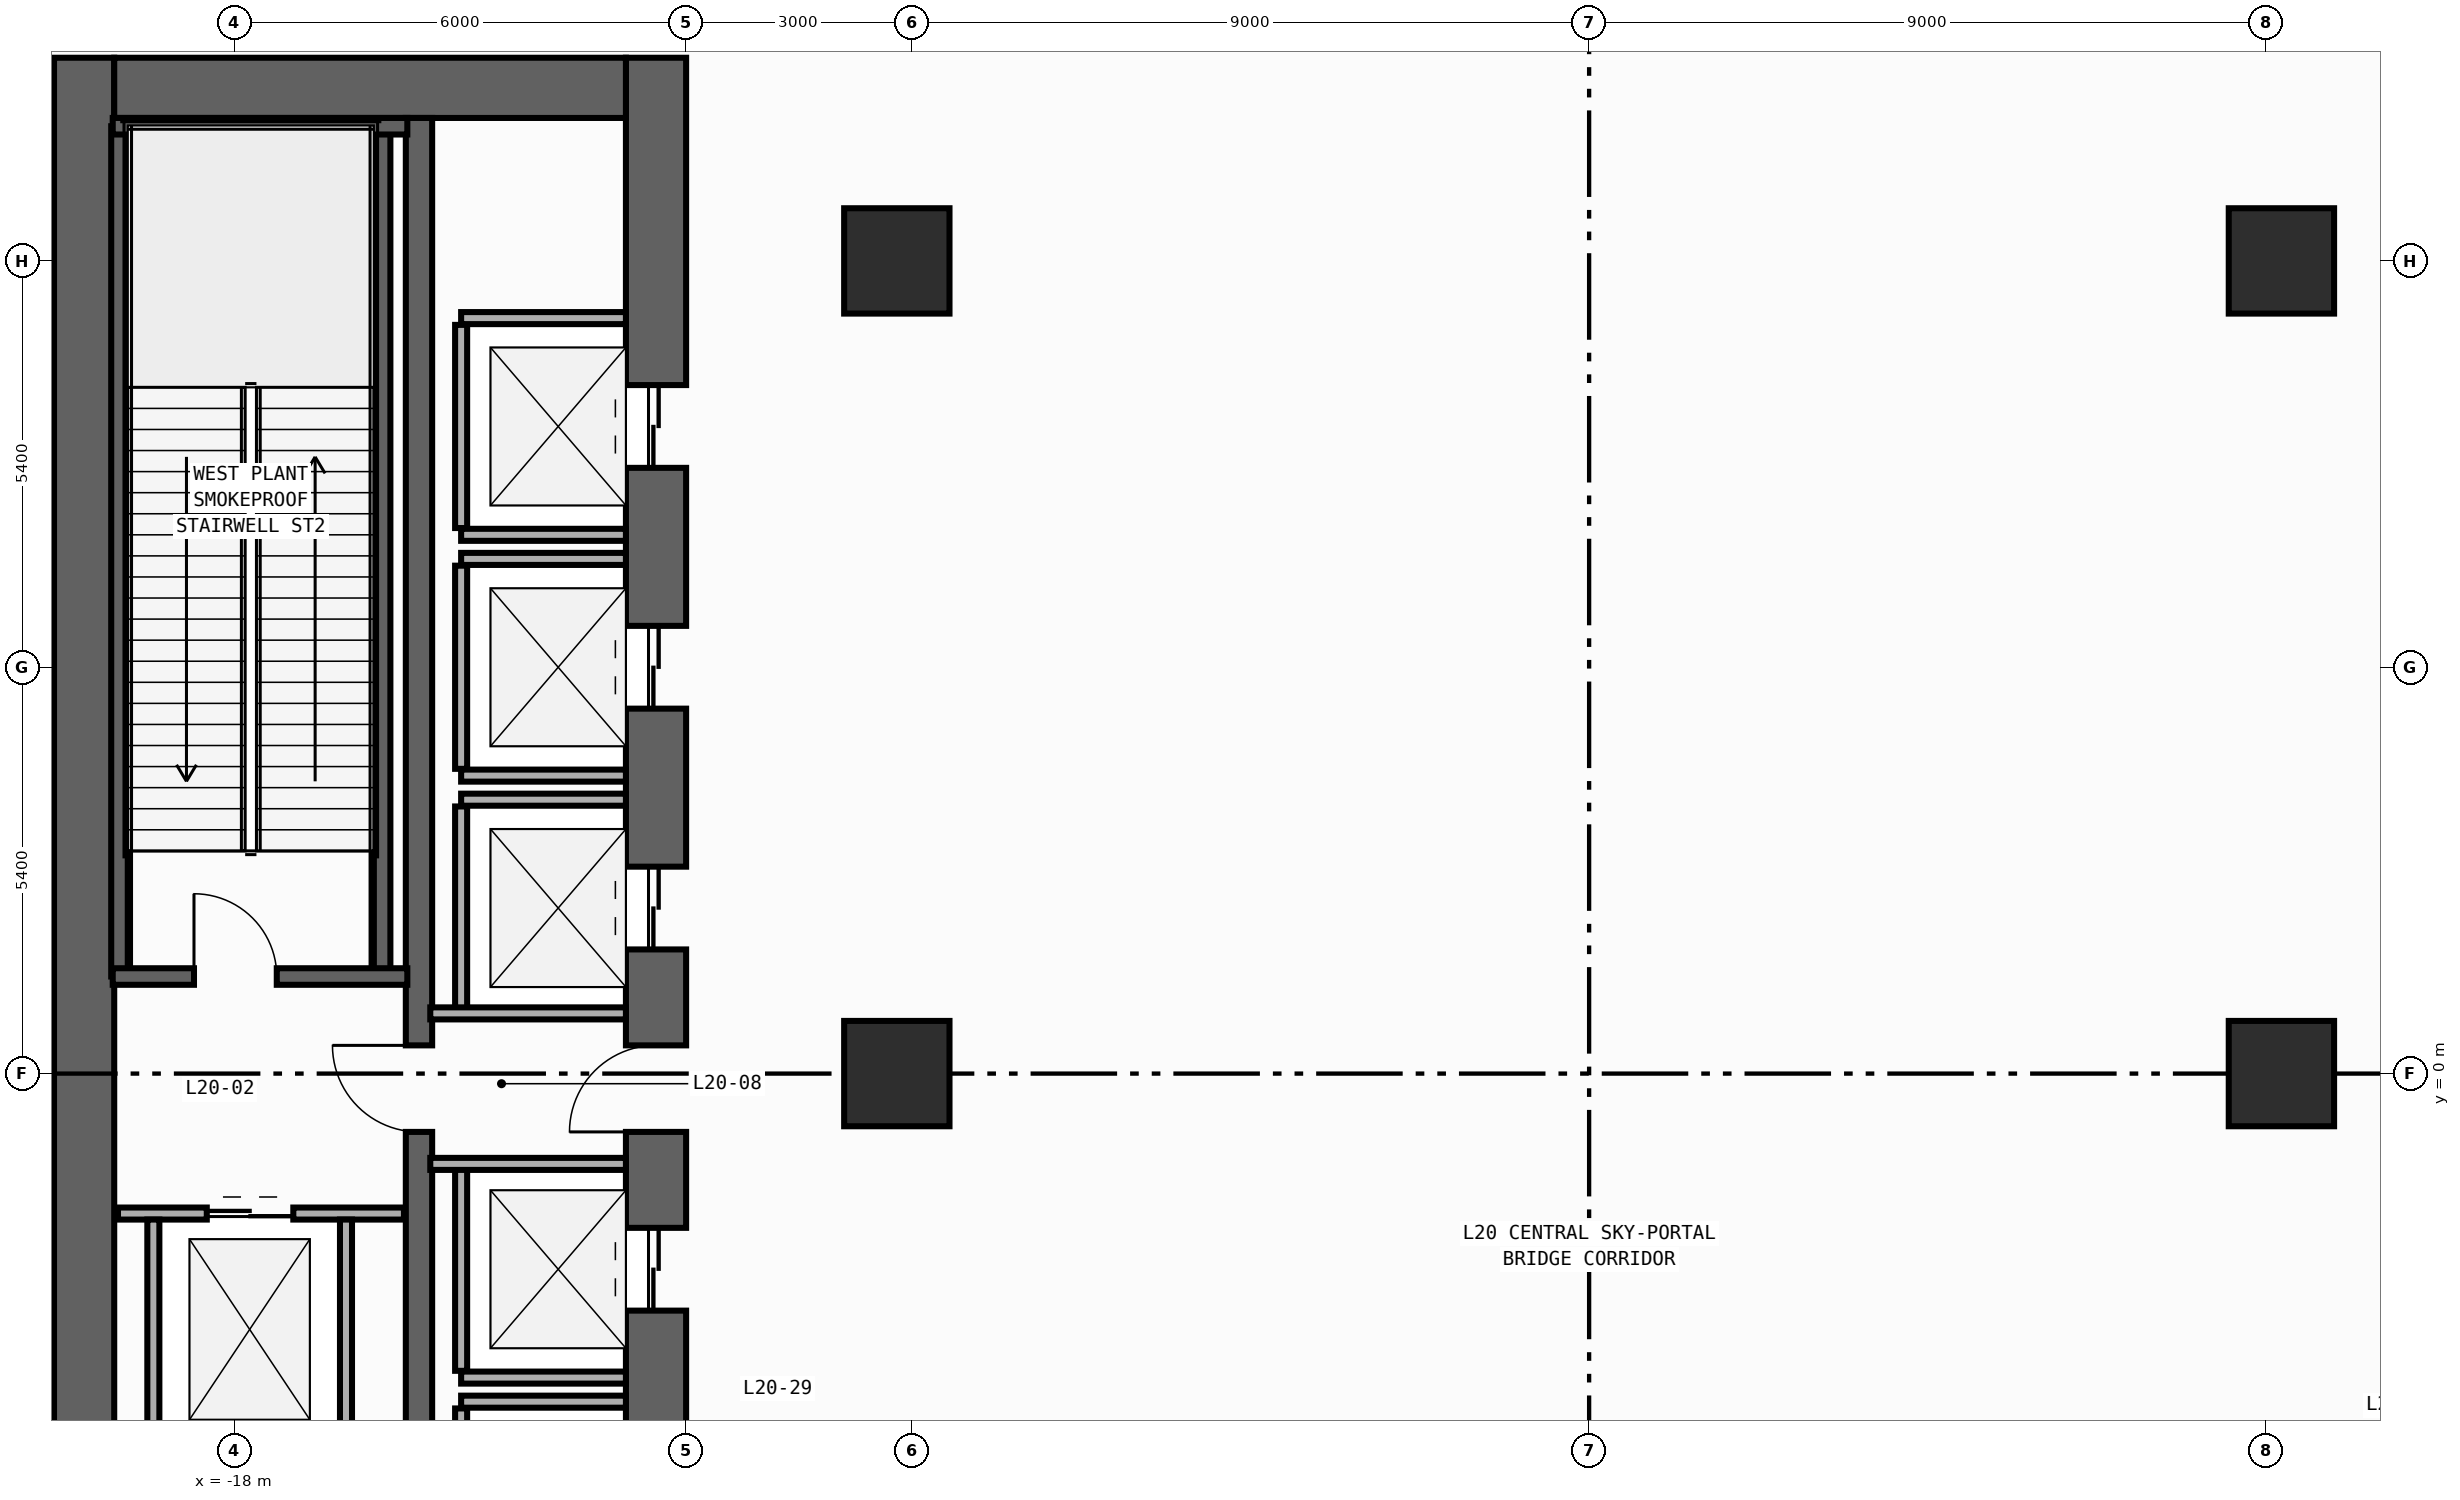
"""IFC4 building model, lengths in metres.
Left out: names, types, materials, properties, quantities, classifications, styles, units other than length and angle.
Written with IfcOpenShell. Run it as: python <this file> out.ifc"""

import sys

from ifc_helpers import new_model, si_unit, direction, frame, frame_2d, origin, origin_2d, place, context, subcontext, project, spatial, rectangle, extrude, element, fill, save


model = new_model("IFC4")
c1 = context("Model", 3, precision=1e-05, world=origin(), true_north=direction((0.0, 1.0)))
c2 = subcontext(c1, "Body", "Model", "MODEL_VIEW")
j1 = project(units=[si_unit("LENGTHUNIT", "METRE"), si_unit("PLANEANGLEUNIT", "RADIAN")], contexts=[c1])
p1 = place(None, origin())
s1 = spatial("IfcSite", under=j1, at=p1, CompositionType="ELEMENT")
p2 = place(p1, origin())
s2 = spatial("IfcBuilding", under=s1, at=p2, CompositionType="ELEMENT")
p3 = place(p2, frame((0.0, 0.0, 84.8)))
s3 = spatial("IfcBuildingStorey", under=s2, at=p3, CompositionType="ELEMENT", Elevation=84.8)
p4 = place(p3, frame((-20.0, -13.5, 0.0), z_axis=(0.0, 0.0, 1.0), x_axis=(0.0, 1.0, 0.0)))
e1 = element("IfcWall", 1, at=p4, inside=s3, PredefinedType="SHEAR", context=c2, shape_type="SweptSolid", body=[
    extrude(rectangle(XDim=27.0, YDim=0.8, at=frame_2d((13.5, 0.0))), origin(), (0.0, 0.0, 1.0), 8.14),
])
p5 = place(p3, frame((-12.4, -13.5, 0.0), z_axis=(0.0, 0.0, 1.0), x_axis=(0.0, 1.0, 0.0)))
e2 = element("IfcWall", 2, at=p5, inside=s3, PredefinedType="SHEAR", context=c2, shape_type="SweptSolid", body=[
    extrude(rectangle(XDim=27.0, YDim=0.8, at=frame_2d((13.5, 0.0))), origin(), (0.0, 0.0, 1.0), 8.14),
])
p6 = place(p5, frame((21.55, 0.0, 0.0)))
e3 = element("IfcOpeningElement", 3, at=p6, cuts=e2, PredefinedType="OPENING", context=c2, shape_type="SweptSolid", body=[
    extrude(rectangle(XDim=1.1, YDim=2.2, at=frame_2d((0.55, 1.1))), frame((0.0, 0.41, 0.0), z_axis=(0.0, -1.0, 0.0), x_axis=(1.0, 0.0, 0.0)), (0.0, 0.0, 1.0), 0.82),
])
p7 = place(p5, frame((18.35, 0.0, 0.0)))
e4 = element("IfcOpeningElement", 4, at=p7, cuts=e2, PredefinedType="OPENING", context=c2, shape_type="SweptSolid", body=[
    extrude(rectangle(XDim=1.1, YDim=2.2, at=frame_2d((0.55, 1.1))), frame((0.0, 0.41, 0.0), z_axis=(0.0, -1.0, 0.0), x_axis=(1.0, 0.0, 0.0)), (0.0, 0.0, 1.0), 0.82),
])
p8 = place(p5, frame((15.15, 0.0, 0.0)))
e5 = element("IfcOpeningElement", 5, at=p8, cuts=e2, PredefinedType="OPENING", context=c2, shape_type="SweptSolid", body=[
    extrude(rectangle(XDim=1.1, YDim=2.2, at=frame_2d((0.55, 1.1))), frame((0.0, 0.41, 0.0), z_axis=(0.0, -1.0, 0.0), x_axis=(1.0, 0.0, 0.0)), (0.0, 0.0, 1.0), 0.82),
])
p9 = place(p5, frame((10.35, 0.0, 0.0)))
e6 = element("IfcOpeningElement", 6, at=p9, cuts=e2, PredefinedType="OPENING", context=c2, shape_type="SweptSolid", body=[
    extrude(rectangle(XDim=1.1, YDim=2.2, at=frame_2d((0.55, 1.1))), frame((0.0, 0.41, 0.0), z_axis=(0.0, -1.0, 0.0), x_axis=(1.0, 0.0, 0.0)), (0.0, 0.0, 1.0), 0.82),
])
p10 = place(p5, frame((7.15, 0.0, 0.0)))
e7 = element("IfcOpeningElement", 7, at=p10, cuts=e2, PredefinedType="OPENING", context=c2, shape_type="SweptSolid", body=[
    extrude(rectangle(XDim=1.1, YDim=2.2, at=frame_2d((0.55, 1.1))), frame((0.0, 0.41, 0.0), z_axis=(0.0, -1.0, 0.0), x_axis=(1.0, 0.0, 0.0)), (0.0, 0.0, 1.0), 0.82),
])
p11 = place(p5, frame((3.95, 0.0, 0.0)))
e8 = element("IfcOpeningElement", 8, at=p11, cuts=e2, PredefinedType="OPENING", context=c2, shape_type="SweptSolid", body=[
    extrude(rectangle(XDim=1.1, YDim=2.2, at=frame_2d((0.55, 1.1))), frame((0.0, 0.41, 0.0), z_axis=(0.0, -1.0, 0.0), x_axis=(1.0, 0.0, 0.0)), (0.0, 0.0, 1.0), 0.82),
])
p12 = place(p5, frame((12.725, 0.0, 0.0)))
e9 = element("IfcOpeningElement", 9, at=p12, cuts=e2, PredefinedType="OPENING", context=c2, shape_type="SweptSolid", body=[
    extrude(rectangle(XDim=1.15, YDim=2.2, at=frame_2d((0.575, 1.1))), frame((0.0, 0.41, 0.0), z_axis=(0.0, -1.0, 0.0), x_axis=(1.0, 0.0, 0.0)), (0.0, 0.0, 1.0), 0.82),
])
p13 = place(p5, frame((1.625, 0.0, 0.0)))
e10 = element("IfcOpeningElement", 10, at=p13, cuts=e2, PredefinedType="OPENING", context=c2, shape_type="SweptSolid", body=[
    extrude(rectangle(XDim=0.85, YDim=2.1, at=frame_2d((0.425, 1.05))), frame((0.0, 0.41, 0.0), z_axis=(0.0, -1.0, 0.0), x_axis=(1.0, 0.0, 0.0)), (0.0, 0.0, 1.0), 0.82),
])
p14 = place(p3, frame((-19.6, 13.1, 0.0), z_axis=(0.0, 0.0, 1.0), x_axis=(1.0, 0.0, 0.0)))
e11 = element("IfcWall", 11, at=p14, inside=s3, PredefinedType="SHEAR", context=c2, shape_type="SweptSolid", body=[
    extrude(rectangle(XDim=6.8, YDim=0.8, at=frame_2d((3.4, 0.0))), origin(), (0.0, 0.0, 1.0), 8.14),
])
p15 = place(p3, frame((-15.55, -12.7, 0.0), z_axis=(0.0, 0.0, 1.0), x_axis=(0.0, 1.0, 0.0)))
e12 = element("IfcWall", 12, at=p15, inside=s3, PredefinedType="SHEAR", context=c2, shape_type="SweptSolid", body=[
    extrude(rectangle(XDim=25.4, YDim=0.35, at=frame_2d((12.7, 0.0))), origin(), (0.0, 0.0, 1.0), 8.14),
])
p16 = place(p15, frame((11.925, 0.0, 0.0)))
e13 = element("IfcOpeningElement", 13, at=p16, cuts=e12, PredefinedType="OPENING", context=c2, shape_type="SweptSolid", body=[
    extrude(rectangle(XDim=1.15, YDim=2.2, at=frame_2d((0.575, 1.1))), frame((0.0, 0.185, 0.0), z_axis=(0.0, -1.0, 0.0), x_axis=(1.0, 0.0, 0.0)), (0.0, 0.0, 1.0), 0.37),
])
p17 = place(p15, frame((0.825, 0.0, 0.0)))
e14 = element("IfcOpeningElement", 14, at=p17, cuts=e12, PredefinedType="OPENING", context=c2, shape_type="SweptSolid", body=[
    extrude(rectangle(XDim=0.85, YDim=2.1, at=frame_2d((0.425, 1.05))), frame((0.0, 0.185, 0.0), z_axis=(0.0, -1.0, 0.0), x_axis=(1.0, 0.0, 0.0)), (0.0, 0.0, 1.0), 0.37),
])
for number, where, z_axis, x_axis in (
    (15, (-16.04, 1.29, 0.0), (0.0, 0.0, 1.0), (0.0, 1.0, 0.0)),
    (16, (-19.53, 1.29, 0.0), (0.0, 0.0, 1.0), (0.0, 1.0, 0.0)),
):
    element("IfcWall", number, at=place(p3, frame(where, z_axis=z_axis, x_axis=x_axis)), inside=s3, PredefinedType="SHEAR", context=c2, shape_type="SweptSolid", body=[
        extrude(rectangle(XDim=11.3, YDim=0.22, at=frame_2d((5.65, 0.0))), origin(), (0.0, 0.0, 1.0), 8.14),
    ])
p18 = place(p3, frame((-19.62, 12.59, 0.0), z_axis=(0.0, 0.0, 1.0), x_axis=(1.0, 0.0, 0.0)))
e17 = element("IfcWall", 17, at=p18, inside=s3, PredefinedType="SHEAR", context=c2, shape_type="SweptSolid", body=[
    extrude(rectangle(XDim=3.915, YDim=0.22, at=frame_2d((1.958, 0.0))), origin(), (0.0, 0.0, 1.0), 8.14),
])
p19 = place(p3, frame((-19.62, 1.29, 0.0), z_axis=(0.0, 0.0, 1.0), x_axis=(1.0, 0.0, 0.0)))
e18 = element("IfcWall", 18, at=p19, inside=s3, PredefinedType="SHEAR", context=c2, shape_type="SweptSolid", body=[
    extrude(rectangle(XDim=3.915, YDim=0.22, at=frame_2d((1.958, 0.0))), origin(), (0.0, 0.0, 1.0), 8.14),
])
p20 = place(p19, frame((1.08, 0.0, 0.0)))
e19 = element("IfcOpeningElement", 19, at=p20, cuts=e18, PredefinedType="OPENING", context=c2, shape_type="SweptSolid", body=[
    extrude(rectangle(XDim=1.1, YDim=2.2, at=frame_2d((0.55, 1.1))), frame((0.0, 0.12, 0.0), z_axis=(0.0, -1.0, 0.0), x_axis=(1.0, 0.0, 0.0)), (0.0, 0.0, 1.0), 0.24),
])
for number, where, z_axis, x_axis in (
    (20, (-9.2, 0.0, 0.0), (0.0, 0.0, 1.0), (1.0, 0.0, 0.0)),
    (21, (-9.2, 10.8, 0.0), (0.0, 0.0, 1.0), (1.0, 0.0, 0.0)),
    (22, (9.2, 0.0, 0.0), (0.0, 0.0, 1.0), (1.0, 0.0, 0.0)),
    (23, (9.2, 10.8, 0.0), (0.0, 0.0, 1.0), (1.0, 0.0, 0.0)),
):
    element("IfcColumn", number, at=place(p3, frame(where, z_axis=z_axis, x_axis=x_axis)), inside=s3, PredefinedType="COLUMN", context=c2, shape_type="SweptSolid", body=[
        extrude(rectangle(XDim=1.4, YDim=1.4, at=origin_2d()), origin(), (0.0, 0.0, 1.0), 8.4),
    ])
for number, where, z_axis, x_axis in (
    (24, (-14.99, 7.16, 0.0), (0.0, 0.0, 1.0), (1.0, 0.0, 0.0)),
    (25, (-14.99, 10.04, 0.0), (0.0, 0.0, 1.0), (1.0, 0.0, 0.0)),
):
    element("IfcWall", number, at=place(p3, frame(where, z_axis=z_axis, x_axis=x_axis)), inside=s3, PredefinedType="STANDARD", context=c2, shape_type="SweptSolid", body=[
        extrude(rectangle(XDim=2.19, YDim=0.16, at=frame_2d((1.095, 0.0))), origin(), (0.0, 0.0, 1.0), 8.14),
    ])
p21 = place(p3, frame((-14.99, 7.25, 0.0), z_axis=(0.0, 0.0, 1.0), x_axis=(0.0, 1.0, 0.0)))
e26 = element("IfcWall", 26, at=p21, inside=s3, PredefinedType="STANDARD", context=c2, shape_type="SweptSolid", body=[
    extrude(rectangle(XDim=2.7, YDim=0.16, at=frame_2d((1.35, 0.0))), origin(), (0.0, 0.0, 1.0), 8.14),
])
for number, where, z_axis, x_axis in (
    (27, (-14.99, 3.96, 0.0), (0.0, 0.0, 1.0), (1.0, 0.0, 0.0)),
    (28, (-14.99, 6.84, 0.0), (0.0, 0.0, 1.0), (1.0, 0.0, 0.0)),
):
    element("IfcWall", number, at=place(p3, frame(where, z_axis=z_axis, x_axis=x_axis)), inside=s3, PredefinedType="STANDARD", context=c2, shape_type="SweptSolid", body=[
        extrude(rectangle(XDim=2.19, YDim=0.16, at=frame_2d((1.095, 0.0))), origin(), (0.0, 0.0, 1.0), 8.14),
    ])
p22 = place(p3, frame((-14.99, 4.05, 0.0), z_axis=(0.0, 0.0, 1.0), x_axis=(0.0, 1.0, 0.0)))
e29 = element("IfcWall", 29, at=p22, inside=s3, PredefinedType="STANDARD", context=c2, shape_type="SweptSolid", body=[
    extrude(rectangle(XDim=2.7, YDim=0.16, at=frame_2d((1.35, 0.0))), origin(), (0.0, 0.0, 1.0), 8.14),
])
p23 = place(p3, frame((-14.99, 3.64, 0.0), z_axis=(0.0, 0.0, 1.0), x_axis=(1.0, 0.0, 0.0)))
e30 = element("IfcWall", 30, at=p23, inside=s3, PredefinedType="STANDARD", context=c2, shape_type="SweptSolid", body=[
    extrude(rectangle(XDim=2.19, YDim=0.16, at=frame_2d((1.095, 0.0))), origin(), (0.0, 0.0, 1.0), 8.14),
])
p24 = place(p3, frame((-14.99, 0.85, 0.0), z_axis=(0.0, 0.0, 1.0), x_axis=(0.0, 1.0, 0.0)))
e31 = element("IfcWall", 31, at=p24, inside=s3, PredefinedType="STANDARD", context=c2, shape_type="SweptSolid", body=[
    extrude(rectangle(XDim=2.7, YDim=0.16, at=frame_2d((1.35, 0.0))), origin(), (0.0, 0.0, 1.0), 8.14),
])
p25 = place(p3, frame((-14.99, -4.04, 0.0), z_axis=(0.0, 0.0, 1.0), x_axis=(1.0, 0.0, 0.0)))
e32 = element("IfcWall", 32, at=p25, inside=s3, PredefinedType="STANDARD", context=c2, shape_type="SweptSolid", body=[
    extrude(rectangle(XDim=2.19, YDim=0.16, at=frame_2d((1.095, 0.0))), origin(), (0.0, 0.0, 1.0), 8.14),
])
p26 = place(p3, frame((-14.99, -3.95, 0.0), z_axis=(0.0, 0.0, 1.0), x_axis=(0.0, 1.0, 0.0)))
e33 = element("IfcWall", 33, at=p26, inside=s3, PredefinedType="STANDARD", context=c2, shape_type="SweptSolid", body=[
    extrude(rectangle(XDim=2.7, YDim=0.16, at=frame_2d((1.35, 0.0))), origin(), (0.0, 0.0, 1.0), 8.14),
])
p27 = place(p3, frame((-14.99, -4.36, 0.0), z_axis=(0.0, 0.0, 1.0), x_axis=(1.0, 0.0, 0.0)))
e34 = element("IfcWall", 34, at=p27, inside=s3, PredefinedType="STANDARD", context=c2, shape_type="SweptSolid", body=[
    extrude(rectangle(XDim=2.19, YDim=0.16, at=frame_2d((1.095, 0.0))), origin(), (0.0, 0.0, 1.0), 8.14),
])
p28 = place(p3, frame((-14.99, -7.15, 0.0), z_axis=(0.0, 0.0, 1.0), x_axis=(0.0, 1.0, 0.0)))
e35 = element("IfcWall", 35, at=p28, inside=s3, PredefinedType="STANDARD", context=c2, shape_type="SweptSolid", body=[
    extrude(rectangle(XDim=2.7, YDim=0.16, at=frame_2d((1.35, 0.0))), origin(), (0.0, 0.0, 1.0), 8.14),
])
p29 = place(p3, frame((-19.55, -1.86, 0.0), z_axis=(0.0, 0.0, 1.0), x_axis=(1.0, 0.0, 0.0)))
e36 = element("IfcWall", 36, at=p29, inside=s3, PredefinedType="STANDARD", context=c2, shape_type="SweptSolid", body=[
    extrude(rectangle(XDim=3.8, YDim=0.16, at=frame_2d((1.9, 0.0))), origin(), (0.0, 0.0, 1.0), 8.14),
])
p30 = place(p29, frame((1.18, 0.0, 0.0)))
e37 = element("IfcOpeningElement", 37, at=p30, cuts=e36, PredefinedType="OPENING", context=c2, shape_type="SweptSolid", body=[
    extrude(rectangle(XDim=1.15, YDim=2.2, at=frame_2d((0.575, 1.1))), frame((0.0, 0.09, 0.0), z_axis=(0.0, -1.0, 0.0), x_axis=(1.0, 0.0, 0.0)), (0.0, 0.0, 1.0), 0.18),
])
for number, where, z_axis, x_axis in (
    (38, (-19.08, -4.9, 0.0), (0.0, 0.0, 1.0), (0.0, 1.0, 0.0)),
    (39, (-16.52, -4.9, 0.0), (0.0, 0.0, 1.0), (0.0, 1.0, 0.0)),
):
    element("IfcWall", number, at=place(p3, frame(where, z_axis=z_axis, x_axis=x_axis)), inside=s3, PredefinedType="STANDARD", context=c2, shape_type="SweptSolid", body=[
        extrude(rectangle(XDim=2.96, YDim=0.16, at=frame_2d((1.48, 0.0))), origin(), (0.0, 0.0, 1.0), 8.14),
    ])
for number, where, z_axis, x_axis in (
    (40, (-15.4, 0.8, 0.0), (0.0, 0.0, 1.0), (1.0, 0.0, 0.0)),
    (41, (-15.4, -1.2, 0.0), (0.0, 0.0, 1.0), (1.0, 0.0, 0.0)),
):
    element("IfcWall", number, at=place(p3, frame(where, z_axis=z_axis, x_axis=x_axis)), inside=s3, PredefinedType="STANDARD", context=c2, shape_type="SweptSolid", body=[
        extrude(rectangle(XDim=2.6, YDim=0.16, at=frame_2d((1.3, 0.0))), origin(), (0.0, 0.0, 1.0), 8.14),
    ])
p31 = place(p20, origin())
e42 = element("IfcDoor", 42, at=p31, inside=s3, OperationType="SINGLE_SWING_LEFT", PredefinedType="DOOR", context=c2, shape_type="SweptSolid", body=[
    extrude(rectangle(XDim=1.1, YDim=2.2, at=frame_2d((0.55, 1.1))), frame((0.0, 0.025, 0.0), z_axis=(0.0, -1.0, 0.0), x_axis=(1.0, 0.0, 0.0)), (0.0, 0.0, 1.0), 0.05),
])
fill(e19, e42)
p32 = place(p6, origin())
e43 = element("IfcDoor", 43, at=p32, inside=s3, OperationType="DOUBLE_DOOR_SLIDING", PredefinedType="DOOR", context=c2, shape_type="SweptSolid", body=[
    extrude(rectangle(XDim=1.1, YDim=2.2, at=frame_2d((0.55, 1.1))), frame((0.0, 0.025, 0.0), z_axis=(0.0, -1.0, 0.0), x_axis=(1.0, 0.0, 0.0)), (0.0, 0.0, 1.0), 0.05),
])
fill(e3, e43)
p33 = place(p7, origin())
e44 = element("IfcDoor", 44, at=p33, inside=s3, OperationType="DOUBLE_DOOR_SLIDING", PredefinedType="DOOR", context=c2, shape_type="SweptSolid", body=[
    extrude(rectangle(XDim=1.1, YDim=2.2, at=frame_2d((0.55, 1.1))), frame((0.0, 0.025, 0.0), z_axis=(0.0, -1.0, 0.0), x_axis=(1.0, 0.0, 0.0)), (0.0, 0.0, 1.0), 0.05),
])
fill(e4, e44)
p34 = place(p8, origin())
e45 = element("IfcDoor", 45, at=p34, inside=s3, OperationType="DOUBLE_DOOR_SLIDING", PredefinedType="DOOR", context=c2, shape_type="SweptSolid", body=[
    extrude(rectangle(XDim=1.1, YDim=2.2, at=frame_2d((0.55, 1.1))), frame((0.0, 0.025, 0.0), z_axis=(0.0, -1.0, 0.0), x_axis=(1.0, 0.0, 0.0)), (0.0, 0.0, 1.0), 0.05),
])
fill(e5, e45)
p35 = place(p9, origin())
e46 = element("IfcDoor", 46, at=p35, inside=s3, OperationType="DOUBLE_DOOR_SLIDING", PredefinedType="DOOR", context=c2, shape_type="SweptSolid", body=[
    extrude(rectangle(XDim=1.1, YDim=2.2, at=frame_2d((0.55, 1.1))), frame((0.0, 0.025, 0.0), z_axis=(0.0, -1.0, 0.0), x_axis=(1.0, 0.0, 0.0)), (0.0, 0.0, 1.0), 0.05),
])
fill(e6, e46)
p36 = place(p12, origin())
e47 = element("IfcDoor", 47, at=p36, inside=s3, OperationType="SINGLE_SWING_LEFT", PredefinedType="DOOR", context=c2, shape_type="SweptSolid", body=[
    extrude(rectangle(XDim=1.15, YDim=2.2, at=frame_2d((0.575, 1.1))), frame((0.0, 0.025, 0.0), z_axis=(0.0, -1.0, 0.0), x_axis=(1.0, 0.0, 0.0)), (0.0, 0.0, 1.0), 0.05),
])
fill(e9, e47)
p37 = place(p16, origin())
e48 = element("IfcDoor", 48, at=p37, inside=s3, OperationType="SINGLE_SWING_RIGHT", PredefinedType="DOOR", context=c2, shape_type="SweptSolid", body=[
    extrude(rectangle(XDim=1.15, YDim=2.2, at=frame_2d((0.575, 1.1))), frame((0.0, 0.025, 0.0), z_axis=(0.0, -1.0, 0.0), x_axis=(1.0, 0.0, 0.0)), (0.0, 0.0, 1.0), 0.05),
])
fill(e13, e48)
p38 = place(p30, origin())
e49 = element("IfcDoor", 49, at=p38, inside=s3, OperationType="DOUBLE_DOOR_SLIDING", PredefinedType="DOOR", context=c2, shape_type="SweptSolid", body=[
    extrude(rectangle(XDim=1.15, YDim=2.2, at=frame_2d((0.575, 1.1))), frame((0.0, 0.025, 0.0), z_axis=(0.0, -1.0, 0.0), x_axis=(1.0, 0.0, 0.0)), (0.0, 0.0, 1.0), 0.05),
])
fill(e37, e49)
save(model, sys.argv[1])
